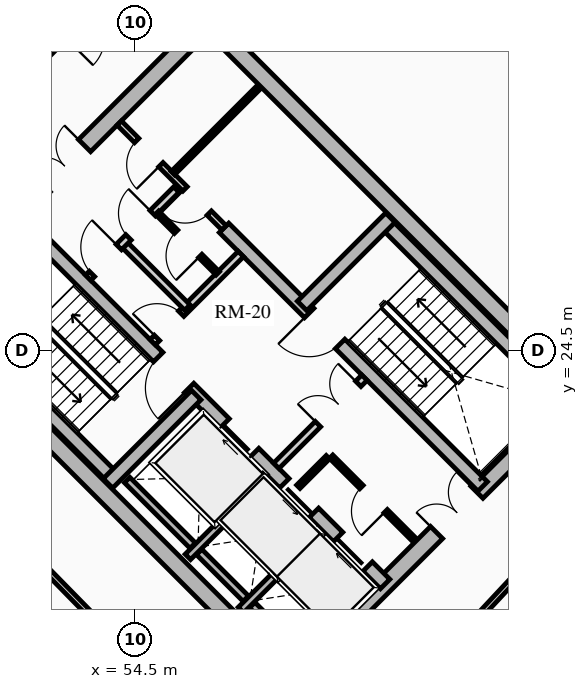
"""IFC4 building model, lengths in metres.
Left out: names, types, materials, properties, quantities, classifications, styles, units other than length and angle.
Written with IfcOpenShell. Run it as: python <this file> out.ifc"""

import sys

from ifc_helpers import new_model, si_unit, direction, frame, frame_2d, origin, place, context, subcontext, project, spatial, rectangle, extrude, source, transform, mapped, element, fill, save


model = new_model("IFC4")
c1 = context("Model", 3, precision=1e-05, world=origin(), true_north=direction((0.0, 1.0)))
c2 = subcontext(c1, "Body", "Model", "MODEL_VIEW")
j1 = project(units=[si_unit("LENGTHUNIT", "METRE"), si_unit("PLANEANGLEUNIT", "RADIAN")], contexts=[c1])
p1 = place(None, origin())
s1 = spatial("IfcSite", under=j1, at=p1, CompositionType="ELEMENT")
p2 = place(p1, origin())
s2 = spatial("IfcBuilding", under=s1, at=p2, CompositionType="ELEMENT")
p3 = place(p2, frame((0.0, 0.0, 140.32)))
s3 = spatial("IfcBuildingStorey", under=s2, at=p3, CompositionType="ELEMENT", Elevation=140.32)
for number, where, z_axis, x_axis in (
    (1, (58.737, 15.697, 0.0), (0.0, 0.0, 1.0), (-0.707, 0.707, 0.0)),
    (2, (66.303, 23.263, 0.0), (0.0, 0.0, 1.0), (-0.707, 0.707, 0.0)),
):
    element("IfcWall", number, at=place(p3, frame(where, z_axis=z_axis, x_axis=x_axis)), inside=s3, PredefinedType="SHEAR", context=c2, shape_type="SweptSolid", body=[
        extrude(rectangle(XDim=14.2, YDim=0.45, at=frame_2d((7.1, 0.0))), origin(), (0.0, 0.0, 1.0), 3.72),
    ])
p4 = place(p3, frame((58.578, 15.856, 0.0), z_axis=(0.0, 0.0, 1.0), x_axis=(0.707106781187, 0.707106781187, 0.0)))
e3 = element("IfcWall", 3, at=p4, inside=s3, PredefinedType="SHEAR", context=c2, shape_type="SweptSolid", body=[
    extrude(rectangle(XDim=10.7, YDim=0.45, at=frame_2d((5.35, 0.0))), origin(), (0.0, 0.0, 1.0), 3.72),
])
m1 = source(origin(), c2, "Body", "SweptSolid", [
    extrude(rectangle(XDim=1.5, YDim=2.02, at=frame_2d((0.75, 1.01))), frame((0.0, 0.235, 0.0), z_axis=(0.0, -1.0, 0.0), x_axis=(1.0, 0.0, 0.0)), (0.0, 0.0, 1.0), 0.47),
])
p5 = place(p4, frame((5.45, 0.0, 0.0)))
e4 = element("IfcOpeningElement", 4, at=p5, cuts=e3, PredefinedType="OPENING", context=c2, shape_type="MappedRepresentation", body=[
    mapped(m1, transform((0.0, 0.0, 0.0), x_axis=(1.0, 0.0, 0.0), y_axis=(0.0, 1.0, 0.0), z_axis=(0.0, 0.0, 1.0), scale=1.0)),
])
p6 = place(p3, frame((48.856, 25.578, 0.0), z_axis=(0.0, 0.0, 1.0), x_axis=(0.707106781187, 0.707106781187, 0.0)))
e5 = element("IfcWall", 5, at=p6, inside=s3, PredefinedType="SHEAR", context=c2, shape_type="SweptSolid", body=[
    extrude(rectangle(XDim=10.7, YDim=0.45, at=frame_2d((5.35, 0.0))), origin(), (0.0, 0.0, 1.0), 3.72),
])
p7 = place(p6, frame((4.6, 0.0, 0.0)))
e6 = element("IfcOpeningElement", 6, at=p7, cuts=e5, PredefinedType="OPENING", context=c2, shape_type="MappedRepresentation", body=[
    mapped(m1, transform((0.0, 0.0, 0.0), x_axis=(1.0, 0.0, 0.0), y_axis=(0.0, 1.0, 0.0), z_axis=(0.0, 0.0, 1.0), scale=1.0)),
])
p8 = place(p3, frame((61.078, 18.355, 0.0), z_axis=(0.0, 0.0, 1.0), x_axis=(-0.707106781187, 0.707106781187, 0.0)))
e7 = element("IfcWall", 7, at=p8, inside=s3, PredefinedType="SHEAR", context=c2, shape_type="SweptSolid", body=[
    extrude(rectangle(XDim=13.75, YDim=0.35, at=frame_2d((6.875, 0.0))), origin(), (0.0, 0.0, 1.0), 3.72),
])
m2 = source(origin(), c2, "Body", "SweptSolid", [
    extrude(rectangle(XDim=1.1, YDim=2.015, at=frame_2d((0.55, 1.007))), frame((0.0, 0.185, 0.0), z_axis=(0.0, -1.0, 0.0), x_axis=(1.0, 0.0, 0.0)), (0.0, 0.0, 1.0), 0.37),
])
p9 = place(p8, frame((4.875, 0.0, 0.0)))
e8 = element("IfcOpeningElement", 8, at=p9, cuts=e7, PredefinedType="OPENING", context=c2, shape_type="MappedRepresentation", body=[
    mapped(m2, transform((0.0, 0.0, 0.0), x_axis=(1.0, 0.0, 0.0), y_axis=(0.0, 1.0, 0.0), z_axis=(0.0, 0.0, 1.0), scale=1.0)),
])
p10 = place(p8, frame((0.65, 0.0, 0.0)))
e9 = element("IfcOpeningElement", 9, at=p10, cuts=e7, PredefinedType="OPENING", context=c2, shape_type="MappedRepresentation", body=[
    mapped(m2, transform((0.0, 0.0, 0.0), x_axis=(1.0, 0.0, 0.0), y_axis=(0.0, 1.0, 0.0), z_axis=(0.0, 0.0, 1.0), scale=1.0)),
])
p11 = place(p8, frame((2.65, 0.0, 0.0)))
e10 = element("IfcOpeningElement", 10, at=p11, cuts=e7, PredefinedType="OPENING", context=c2, shape_type="MappedRepresentation", body=[
    mapped(m2, transform((0.0, 0.0, 0.0), x_axis=(1.0, 0.0, 0.0), y_axis=(0.0, 1.0, 0.0), z_axis=(0.0, 0.0, 1.0), scale=1.0)),
])
m3 = source(origin(), c2, "Body", "SweptSolid", [
    extrude(rectangle(XDim=1.15, YDim=2.02, at=frame_2d((0.575, 1.01))), frame((0.0, 0.185, 0.0), z_axis=(0.0, -1.0, 0.0), x_axis=(1.0, 0.0, 0.0)), (0.0, 0.0, 1.0), 0.37),
])
p12 = place(p8, frame((7.295, 0.0, 0.0)))
e11 = element("IfcOpeningElement", 11, at=p12, cuts=e7, PredefinedType="OPENING", context=c2, shape_type="MappedRepresentation", body=[
    mapped(m3, transform((0.0, 0.0, 0.0), x_axis=(1.0, 0.0, 0.0), y_axis=(0.0, 1.0, 0.0), z_axis=(0.0, 0.0, 1.0), scale=1.0)),
])
p13 = place(p3, frame((63.645, 20.922, 0.0), z_axis=(0.0, 0.0, 1.0), x_axis=(-0.70711946392, 0.707094098226, 0.0)))
e12 = element("IfcWall", 12, at=p13, inside=s3, PredefinedType="SHEAR", context=c2, shape_type="SweptSolid", body=[
    extrude(rectangle(XDim=9.625, YDim=0.35, at=frame_2d((4.812, 0.0))), origin(), (0.0, 0.0, 1.0), 3.72),
])
p14 = place(p13, frame((5.305, 0.0, 0.0)))
e13 = element("IfcOpeningElement", 13, at=p14, cuts=e12, PredefinedType="OPENING", context=c2, shape_type="MappedRepresentation", body=[
    mapped(m3, transform((0.0, 0.0, 0.0), x_axis=(1.0, 0.0, 0.0), y_axis=(0.0, 1.0, 0.0), z_axis=(0.0, 0.0, 1.0), scale=1.0)),
])
p15 = place(p3, frame((53.922, 21.141, 0.0), z_axis=(0.0, 0.0, 1.0), x_axis=(-0.707088616009, 0.707124945897, 0.0)))
e14 = element("IfcWall", 14, at=p15, inside=s3, PredefinedType="SHEAR", context=c2, shape_type="SweptSolid", body=[
    extrude(rectangle(XDim=6.72, YDim=0.35, at=frame_2d((3.36, 0.0))), origin(), (0.0, 0.0, 1.0), 3.72),
])
p16 = place(p3, frame((53.784, 21.003, 0.0), z_axis=(0.0, 0.0, 1.0), x_axis=(0.707106781187, 0.707106781187, 0.0)))
e15 = element("IfcWall", 15, at=p16, inside=s3, PredefinedType="SHEAR", context=c2, shape_type="SweptSolid", body=[
    extrude(rectangle(XDim=3.285, YDim=0.35, at=frame_2d((1.643, 0.0))), origin(), (0.0, 0.0, 1.0), 3.72),
])
p17 = place(p3, frame((65.83, 23.107, 0.0), z_axis=(0.0, 0.0, 1.0), x_axis=(-0.707088616009, 0.707124945897, 0.0)))
e16 = element("IfcWall", 16, at=p17, inside=s3, PredefinedType="SHEAR", context=c2, shape_type="SweptSolid", body=[
    extrude(rectangle(XDim=6.72, YDim=0.35, at=frame_2d((3.36, 0.0))), origin(), (0.0, 0.0, 1.0), 3.72),
])
p18 = place(p3, frame((58.893, 25.674, 0.0), z_axis=(0.0, 0.0, 1.0), x_axis=(0.707106781187, 0.707106781187, 0.0)))
e17 = element("IfcWall", 17, at=p18, inside=s3, PredefinedType="SHEAR", context=c2, shape_type="SweptSolid", body=[
    extrude(rectangle(XDim=3.285, YDim=0.35, at=frame_2d((1.643, 0.0))), origin(), (0.0, 0.0, 1.0), 3.72),
])
p19 = place(p3, frame((55.888, 19.069, 0.0), z_axis=(0.0, 0.0, 1.0), x_axis=(0.707106781187, 0.707106781187, 0.0)))
e18 = element("IfcWall", 18, at=p19, inside=s3, PredefinedType="SHEAR", context=c2, shape_type="SweptSolid", body=[
    extrude(rectangle(XDim=2.97, YDim=0.2, at=frame_2d((1.485, 0.0))), origin(), (0.0, 0.0, 1.0), 3.72),
])
p20 = place(p3, frame((56.015, 19.366, 0.0), z_axis=(0.0, 0.0, 1.0), x_axis=(-0.707106781187, 0.707106781187, 0.0)))
e19 = element("IfcWall", 19, at=p20, inside=s3, PredefinedType="SHEAR", context=c2, shape_type="SweptSolid", body=[
    extrude(rectangle(XDim=2.44, YDim=0.2, at=frame_2d((1.22, 0.0))), origin(), (0.0, 0.0, 1.0), 3.72),
])
p21 = place(p3, frame((57.284, 17.673, 0.0), z_axis=(0.0, 0.0, 1.0), x_axis=(0.707147878904, 0.70706568108, 0.0)))
e20 = element("IfcWall", 20, at=p21, inside=s3, PredefinedType="SHEAR", context=c2, shape_type="SweptSolid", body=[
    extrude(rectangle(XDim=2.97, YDim=0.2, at=frame_2d((1.485, 0.0))), origin(), (0.0, 0.0, 1.0), 3.72),
])
p22 = place(p3, frame((57.412, 17.97, 0.0), z_axis=(0.0, 0.0, 1.0), x_axis=(-0.707106781187, 0.707106781187, 0.0)))
e21 = element("IfcWall", 21, at=p22, inside=s3, PredefinedType="SHEAR", context=c2, shape_type="SweptSolid", body=[
    extrude(rectangle(XDim=1.735, YDim=0.2, at=frame_2d((0.867, 0.0))), origin(), (0.0, 0.0, 1.0), 3.72),
])
p23 = place(p3, frame((58.737, 16.644, 0.0), z_axis=(0.0, 0.0, 1.0), x_axis=(-0.707032117043, 0.707181437447, 0.0)))
e22 = element("IfcWall", 22, at=p23, inside=s3, PredefinedType="SHEAR", context=c2, shape_type="SweptSolid", body=[
    extrude(rectangle(XDim=1.635, YDim=0.2, at=frame_2d((0.817, 0.0))), origin(), (0.0, 0.0, 1.0), 3.72),
])
p24 = place(p3, frame((58.214, 21.467, 0.0), z_axis=(0.0, 0.0, 1.0), x_axis=(0.707106781187, 0.707106781187, 0.0)))
e23 = element("IfcWall", 23, at=p24, inside=s3, PredefinedType="PARTITIONING", context=c2, shape_type="SweptSolid", body=[
    extrude(rectangle(XDim=3.28, YDim=0.2, at=frame_2d((1.64, 0.0))), origin(), (0.0, 0.0, 1.0), 3.465),
])
m4 = source(origin(), c2, "Body", "SweptSolid", [
    extrude(rectangle(XDim=1.5, YDim=2.02, at=frame_2d((0.75, 1.01))), frame((0.0, 0.11, 0.0), z_axis=(0.0, -1.0, 0.0), x_axis=(1.0, 0.0, 0.0)), (0.0, 0.0, 1.0), 0.22),
])
p25 = place(p24, frame((1.55, 0.0, 0.0)))
e24 = element("IfcOpeningElement", 24, at=p25, cuts=e23, PredefinedType="OPENING", context=c2, shape_type="MappedRepresentation", body=[
    mapped(m4, transform((0.0, 0.0, 0.0), x_axis=(1.0, 0.0, 0.0), y_axis=(0.0, 1.0, 0.0), z_axis=(0.0, 0.0, 1.0), scale=1.0)),
])
p26 = place(p3, frame((54.961, 24.719, 0.0), z_axis=(0.0, 0.0, 1.0), x_axis=(0.707106781187, 0.707106781187, 0.0)))
e25 = element("IfcWall", 25, at=p26, inside=s3, PredefinedType="PARTITIONING", context=c2, shape_type="SweptSolid", body=[
    extrude(rectangle(XDim=3.28, YDim=0.2, at=frame_2d((1.64, 0.0))), origin(), (0.0, 0.0, 1.0), 3.465),
])
m5 = source(origin(), c2, "Body", "SweptSolid", [
    extrude(rectangle(XDim=0.9, YDim=2.005, at=frame_2d((0.45, 1.002))), frame((0.0, 0.11, 0.0), z_axis=(0.0, -1.0, 0.0), x_axis=(1.0, 0.0, 0.0)), (0.0, 0.0, 1.0), 0.22),
])
p27 = place(p26, frame((0.16, 0.0, 0.0)))
e26 = element("IfcOpeningElement", 26, at=p27, cuts=e25, PredefinedType="OPENING", context=c2, shape_type="MappedRepresentation", body=[
    mapped(m5, transform((0.0, 0.0, 0.0), x_axis=(1.0, 0.0, 0.0), y_axis=(0.0, 1.0, 0.0), z_axis=(0.0, 0.0, 1.0), scale=1.0)),
])
p28 = place(p3, frame((55.874, 25.631, 0.0), z_axis=(0.0, 0.0, 1.0), x_axis=(-0.707157639372, 0.707055919343, 0.0)))
e27 = element("IfcWall", 27, at=p28, inside=s3, PredefinedType="PARTITIONING", context=c2, shape_type="SweptSolid", body=[
    extrude(rectangle(XDim=2.4, YDim=0.2, at=frame_2d((1.2, 0.0))), origin(), (0.0, 0.0, 1.0), 3.465),
])
p29 = place(p3, frame((53.264, 26.416, 0.0), z_axis=(0.0, 0.0, 1.0), x_axis=(0.707106781187, 0.707106781187, 0.0)))
e28 = element("IfcWall", 28, at=p29, inside=s3, PredefinedType="PARTITIONING", context=c2, shape_type="SweptSolid", body=[
    extrude(rectangle(XDim=3.28, YDim=0.2, at=frame_2d((1.64, 0.0))), origin(), (0.0, 0.0, 1.0), 3.465),
])
m6 = source(origin(), c2, "Body", "SweptSolid", [
    extrude(rectangle(XDim=1.0, YDim=2.015, at=frame_2d((0.5, 1.007))), frame((0.0, 0.11, 0.0), z_axis=(0.0, -1.0, 0.0), x_axis=(1.0, 0.0, 0.0)), (0.0, 0.0, 1.0), 0.22),
])
p30 = place(p29, frame((0.14, 0.0, 0.0)))
e29 = element("IfcOpeningElement", 29, at=p30, cuts=e28, PredefinedType="OPENING", context=c2, shape_type="MappedRepresentation", body=[
    mapped(m6, transform((0.0, 0.0, 0.0), x_axis=(1.0, 0.0, 0.0), y_axis=(0.0, 1.0, 0.0), z_axis=(0.0, 0.0, 1.0), scale=1.0)),
])
p31 = place(p29, frame((1.5, 0.0, 0.0)))
e30 = element("IfcOpeningElement", 30, at=p31, cuts=e28, PredefinedType="OPENING", context=c2, shape_type="MappedRepresentation", body=[
    mapped(m5, transform((0.0, 0.0, 0.0), x_axis=(1.0, 0.0, 0.0), y_axis=(0.0, 1.0, 0.0), z_axis=(0.0, 0.0, 1.0), scale=1.0)),
])
p32 = place(p3, frame((61.835, 19.529, 0.0), z_axis=(0.0, 0.0, 1.0), x_axis=(-0.707146413884, 0.707067146267, 0.0)))
e31 = element("IfcWall", 31, at=p32, inside=s3, PredefinedType="PARTITIONING", context=c2, shape_type="SweptSolid", body=[
    extrude(rectangle(XDim=3.08, YDim=0.125, at=frame_2d((1.54, 0.0))), origin(), (0.0, 0.0, 1.0), 3.465),
])
m7 = source(origin(), c2, "Body", "SweptSolid", [
    extrude(rectangle(XDim=0.9, YDim=2.005, at=frame_2d((0.45, 1.002))), frame((0.0, 0.073, 0.0), z_axis=(0.0, -1.0, 0.0), x_axis=(1.0, 0.0, 0.0)), (0.0, 0.0, 1.0), 0.145),
])
p33 = place(p32, frame((1.05, 0.0, 0.0)))
e32 = element("IfcOpeningElement", 32, at=p33, cuts=e31, PredefinedType="OPENING", context=c2, shape_type="MappedRepresentation", body=[
    mapped(m7, transform((0.0, 0.0, 0.0), x_axis=(1.0, 0.0, 0.0), y_axis=(0.0, 1.0, 0.0), z_axis=(0.0, 0.0, 1.0), scale=1.0)),
])
p34 = place(p3, frame((58.794, 20.915, 0.0), z_axis=(0.0, 0.0, 1.0), x_axis=(0.707106781187, 0.707106781187, 0.0)))
e33 = element("IfcWall", 33, at=p34, inside=s3, PredefinedType="PARTITIONING", context=c2, shape_type="SweptSolid", body=[
    extrude(rectangle(XDim=1.1, YDim=0.125, at=frame_2d((0.55, 0.0))), origin(), (0.0, 0.0, 1.0), 3.465),
])
p35 = place(p3, frame((56.673, 26.529, 0.0), z_axis=(0.0, 0.0, 1.0), x_axis=(-0.707052764397, 0.70716079385, 0.0)))
e34 = element("IfcWall", 34, at=p35, inside=s3, PredefinedType="PARTITIONING", context=c2, shape_type="SweptSolid", body=[
    extrude(rectangle(XDim=2.26, YDim=0.125, at=frame_2d((1.13, 0.0))), origin(), (0.0, 0.0, 1.0), 3.465),
])
p36 = place(p35, frame((0.65, 0.0, 0.0)))
e35 = element("IfcOpeningElement", 35, at=p36, cuts=e34, PredefinedType="OPENING", context=c2, shape_type="MappedRepresentation", body=[
    mapped(m7, transform((0.0, 0.0, 0.0), x_axis=(1.0, 0.0, 0.0), y_axis=(0.0, 1.0, 0.0), z_axis=(0.0, 0.0, 1.0), scale=1.0)),
])
p37 = place(p3, frame((56.839, 27.728, 0.0), z_axis=(0.0, 0.0, 1.0), x_axis=(-0.707106781187, 0.707106781187, 0.0)))
e36 = element("IfcWall", 36, at=p37, inside=s3, PredefinedType="PARTITIONING", context=c2, shape_type="SweptSolid", body=[
    extrude(rectangle(XDim=3.9, YDim=0.16, at=frame_2d((1.95, 0.0))), origin(), (0.0, 0.0, 1.0), 3.465),
])
m8 = source(origin(), c2, "Body", "SweptSolid", [
    extrude(rectangle(XDim=0.9, YDim=2.005, at=frame_2d((0.45, 1.002))), frame((0.0, 0.09, 0.0), z_axis=(0.0, -1.0, 0.0), x_axis=(1.0, 0.0, 0.0)), (0.0, 0.0, 1.0), 0.18),
])
p38 = place(p37, frame((0.55, 0.0, 0.0)))
e37 = element("IfcOpeningElement", 37, at=p38, cuts=e36, PredefinedType="OPENING", context=c2, shape_type="MappedRepresentation", body=[
    mapped(m8, transform((0.0, 0.0, 0.0), x_axis=(1.0, 0.0, 0.0), y_axis=(0.0, 1.0, 0.0), z_axis=(0.0, 0.0, 1.0), scale=1.0)),
])
p39 = place(p37, frame((2.35, 0.0, 0.0)))
e38 = element("IfcOpeningElement", 38, at=p39, cuts=e36, PredefinedType="OPENING", context=c2, shape_type="MappedRepresentation", body=[
    mapped(m8, transform((0.0, 0.0, 0.0), x_axis=(1.0, 0.0, 0.0), y_axis=(0.0, 1.0, 0.0), z_axis=(0.0, 0.0, 1.0), scale=1.0)),
])
p40 = place(p3, frame((55.492, 29.167, 0.0), z_axis=(0.0, 0.0, 1.0), x_axis=(0.707144688645, 0.707068871696, 0.0)))
e39 = element("IfcWall", 39, at=p40, inside=s3, PredefinedType="PARTITIONING", context=c2, shape_type="SweptSolid", body=[
    extrude(rectangle(XDim=3.22, YDim=0.125, at=frame_2d((1.61, 0.0))), origin(), (0.0, 0.0, 1.0), 3.002),
])
p41 = place(p3, frame((54.475, 34.591, 0.0), z_axis=(0.0, 0.0, 1.0), x_axis=(-0.703869646439, -0.710329163714, 0.0)))
e40 = element("IfcWall", 40, at=p41, inside=s3, PredefinedType="PARTITIONING", context=c2, shape_type="SweptSolid", body=[
    extrude(rectangle(XDim=3.364, YDim=0.15, at=frame_2d((1.682, 0.0))), origin(), (0.0, 0.0, 1.0), 3.035),
])
m9 = source(origin(), c2, "Body", "SweptSolid", [
    extrude(rectangle(XDim=1.05, YDim=2.015, at=frame_2d((0.525, 1.007))), frame((0.0, 0.085, 0.0), z_axis=(0.0, -1.0, 0.0), x_axis=(1.0, 0.0, 0.0)), (0.0, 0.0, 1.0), 0.17),
])
p42 = place(p41, frame((1.546, 0.0, 0.0)))
e41 = element("IfcOpeningElement", 41, at=p42, cuts=e40, PredefinedType="OPENING", context=c2, shape_type="MappedRepresentation", body=[
    mapped(m9, transform((0.0, 0.0, 0.0), x_axis=(1.0, 0.0, 0.0), y_axis=(0.0, 1.0, 0.0), z_axis=(0.0, 0.0, 1.0), scale=1.0)),
])
p43 = place(p3, frame((51.949, 18.949, 0.0), z_axis=(0.0, 0.0, 1.0), x_axis=(0.699801520154, -0.714337337951, 0.0)))
e42 = element("IfcWall", 42, at=p43, inside=s3, PredefinedType="PARTITIONING", context=c2, shape_type="SweptSolid", body=[
    extrude(rectangle(XDim=6.097, YDim=0.15, at=frame_2d((3.048, 0.0))), origin(), (0.0, 0.0, 1.0), 3.035),
])
p44 = place(p3, frame((62.839, 16.745, 0.0), z_axis=(0.0, 0.0, 1.0), x_axis=(0.682386779427, 0.73099130177, 0.0)))
e43 = element("IfcWall", 43, at=p44, inside=s3, PredefinedType="PARTITIONING", context=c2, shape_type="SweptSolid", body=[
    extrude(rectangle(XDim=6.6, YDim=0.15, at=frame_2d((3.3, 0.0))), origin(), (0.0, 0.0, 1.0), 3.035),
])
m10 = source(origin(), c2, "Body", "SweptSolid", [
    extrude(rectangle(XDim=1.1, YDim=2.015, at=frame_2d((0.55, 1.007))), frame((0.0, 0.025, 0.0), z_axis=(0.0, -1.0, 0.0), x_axis=(1.0, 0.0, 0.0)), (0.0, 0.0, 1.0), 0.05),
])
p45 = place(p9, origin())
e44 = element("IfcDoor", 44, at=p45, inside=s3, OperationType="SLIDING_TO_RIGHT", PredefinedType="DOOR", context=c2, shape_type="MappedRepresentation", body=[
    mapped(m10, transform((0.0, 0.0, 0.0), x_axis=(1.0, 0.0, 0.0), y_axis=(0.0, 1.0, 0.0), z_axis=(0.0, 0.0, 1.0), scale=1.0)),
])
fill(e8, e44)
p46 = place(p10, origin())
e45 = element("IfcDoor", 45, at=p46, inside=s3, OperationType="SLIDING_TO_RIGHT", PredefinedType="DOOR", context=c2, shape_type="MappedRepresentation", body=[
    mapped(m10, transform((0.0, 0.0, 0.0), x_axis=(1.0, 0.0, 0.0), y_axis=(0.0, 1.0, 0.0), z_axis=(0.0, 0.0, 1.0), scale=1.0)),
])
fill(e9, e45)
p47 = place(p11, origin())
e46 = element("IfcDoor", 46, at=p47, inside=s3, OperationType="SLIDING_TO_LEFT", PredefinedType="DOOR", context=c2, shape_type="MappedRepresentation", body=[
    mapped(m10, transform((0.0, 0.0, 0.0), x_axis=(1.0, 0.0, 0.0), y_axis=(0.0, 1.0, 0.0), z_axis=(0.0, 0.0, 1.0), scale=1.0)),
])
fill(e10, e46)
m11 = source(origin(), c2, "Body", "SweptSolid", [
    extrude(rectangle(XDim=1.15, YDim=2.02, at=frame_2d((0.575, 1.01))), frame((0.0, 0.025, 0.0), z_axis=(0.0, -1.0, 0.0), x_axis=(1.0, 0.0, 0.0)), (0.0, 0.0, 1.0), 0.05),
])
p48 = place(p12, origin())
e47 = element("IfcDoor", 47, at=p48, inside=s3, OperationType="SINGLE_SWING_LEFT", PredefinedType="DOOR", context=c2, shape_type="MappedRepresentation", body=[
    mapped(m11, transform((0.0, 0.0, 0.0), x_axis=(1.0, 0.0, 0.0), y_axis=(0.0, 1.0, 0.0), z_axis=(0.0, 0.0, 1.0), scale=1.0)),
])
fill(e11, e47)
p49 = place(p14, origin())
e48 = element("IfcDoor", 48, at=p49, inside=s3, OperationType="SINGLE_SWING_RIGHT", PredefinedType="DOOR", context=c2, shape_type="MappedRepresentation", body=[
    mapped(m11, transform((0.0, 0.0, 0.0), x_axis=(1.0, 0.0, 0.0), y_axis=(0.0, 1.0, 0.0), z_axis=(0.0, 0.0, 1.0), scale=1.0)),
])
fill(e13, e48)
m12 = source(origin(), c2, "Body", "SweptSolid", [
    extrude(rectangle(XDim=1.5, YDim=2.02, at=frame_2d((0.75, 1.01))), frame((0.0, 0.025, 0.0), z_axis=(0.0, -1.0, 0.0), x_axis=(1.0, 0.0, 0.0)), (0.0, 0.0, 1.0), 0.05),
])
p50 = place(p7, origin())
e49 = element("IfcDoor", 49, at=p50, inside=s3, OperationType="DOUBLE_DOOR_SINGLE_SWING", PredefinedType="DOOR", context=c2, shape_type="MappedRepresentation", body=[
    mapped(m12, transform((0.0, 0.0, 0.0), x_axis=(1.0, 0.0, 0.0), y_axis=(0.0, 1.0, 0.0), z_axis=(0.0, 0.0, 1.0), scale=1.0)),
])
fill(e6, e49)
p51 = place(p5, origin())
e50 = element("IfcDoor", 50, at=p51, inside=s3, OperationType="DOUBLE_DOOR_SINGLE_SWING", PredefinedType="DOOR", context=c2, shape_type="MappedRepresentation", body=[
    mapped(m12, transform((0.0, 0.0, 0.0), x_axis=(1.0, 0.0, 0.0), y_axis=(0.0, 1.0, 0.0), z_axis=(0.0, 0.0, 1.0), scale=1.0)),
])
fill(e4, e50)
p52 = place(p25, origin())
e51 = element("IfcDoor", 51, at=p52, inside=s3, OperationType="DOUBLE_DOOR_SINGLE_SWING", PredefinedType="DOOR", context=c2, shape_type="MappedRepresentation", body=[
    mapped(m12, transform((0.0, 0.0, 0.0), x_axis=(1.0, 0.0, 0.0), y_axis=(0.0, 1.0, 0.0), z_axis=(0.0, 0.0, 1.0), scale=1.0)),
])
fill(e24, e51)
m13 = source(origin(), c2, "Body", "SweptSolid", [
    extrude(rectangle(XDim=0.9, YDim=2.005, at=frame_2d((0.45, 1.002))), frame((0.0, 0.025, 0.0), z_axis=(0.0, -1.0, 0.0), x_axis=(1.0, 0.0, 0.0)), (0.0, 0.0, 1.0), 0.05),
])
p53 = place(p27, origin())
e52 = element("IfcDoor", 52, at=p53, inside=s3, OperationType="SINGLE_SWING_LEFT", PredefinedType="DOOR", context=c2, shape_type="MappedRepresentation", body=[
    mapped(m13, transform((0.0, 0.0, 0.0), x_axis=(1.0, 0.0, 0.0), y_axis=(0.0, 1.0, 0.0), z_axis=(0.0, 0.0, 1.0), scale=1.0)),
])
fill(e26, e52)
m14 = source(origin(), c2, "Body", "SweptSolid", [
    extrude(rectangle(XDim=1.0, YDim=2.015, at=frame_2d((0.5, 1.007))), frame((0.0, 0.025, 0.0), z_axis=(0.0, -1.0, 0.0), x_axis=(1.0, 0.0, 0.0)), (0.0, 0.0, 1.0), 0.05),
])
p54 = place(p30, origin())
e53 = element("IfcDoor", 53, at=p54, inside=s3, OperationType="SINGLE_SWING_RIGHT", PredefinedType="DOOR", context=c2, shape_type="MappedRepresentation", body=[
    mapped(m14, transform((0.0, 0.0, 0.0), x_axis=(1.0, 0.0, 0.0), y_axis=(0.0, 1.0, 0.0), z_axis=(0.0, 0.0, 1.0), scale=1.0)),
])
fill(e29, e53)
p55 = place(p33, origin())
e54 = element("IfcDoor", 54, at=p55, inside=s3, OperationType="SINGLE_SWING_LEFT", PredefinedType="DOOR", context=c2, shape_type="MappedRepresentation", body=[
    mapped(m13, transform((0.0, 0.0, 0.0), x_axis=(1.0, 0.0, 0.0), y_axis=(0.0, 1.0, 0.0), z_axis=(0.0, 0.0, 1.0), scale=1.0)),
])
fill(e32, e54)
p56 = place(p31, origin())
e55 = element("IfcDoor", 55, at=p56, inside=s3, OperationType="SINGLE_SWING_RIGHT", PredefinedType="DOOR", context=c2, shape_type="MappedRepresentation", body=[
    mapped(m13, transform((0.0, 0.0, 0.0), x_axis=(1.0, 0.0, 0.0), y_axis=(0.0, 1.0, 0.0), z_axis=(0.0, 0.0, 1.0), scale=1.0)),
])
fill(e30, e55)
p57 = place(p36, origin())
e56 = element("IfcDoor", 56, at=p57, inside=s3, OperationType="SINGLE_SWING_LEFT", PredefinedType="DOOR", context=c2, shape_type="MappedRepresentation", body=[
    mapped(m13, transform((0.0, 0.0, 0.0), x_axis=(1.0, 0.0, 0.0), y_axis=(0.0, 1.0, 0.0), z_axis=(0.0, 0.0, 1.0), scale=1.0)),
])
fill(e35, e56)
p58 = place(p38, origin())
e57 = element("IfcDoor", 57, at=p58, inside=s3, OperationType="SINGLE_SWING_RIGHT", PredefinedType="DOOR", context=c2, shape_type="MappedRepresentation", body=[
    mapped(m13, transform((0.0, 0.0, 0.0), x_axis=(1.0, 0.0, 0.0), y_axis=(0.0, 1.0, 0.0), z_axis=(0.0, 0.0, 1.0), scale=1.0)),
])
fill(e37, e57)
p59 = place(p39, origin())
e58 = element("IfcDoor", 58, at=p59, inside=s3, OperationType="SINGLE_SWING_LEFT", PredefinedType="DOOR", context=c2, shape_type="MappedRepresentation", body=[
    mapped(m13, transform((0.0, 0.0, 0.0), x_axis=(1.0, 0.0, 0.0), y_axis=(0.0, 1.0, 0.0), z_axis=(0.0, 0.0, 1.0), scale=1.0)),
])
fill(e38, e58)
save(model, sys.argv[1])
